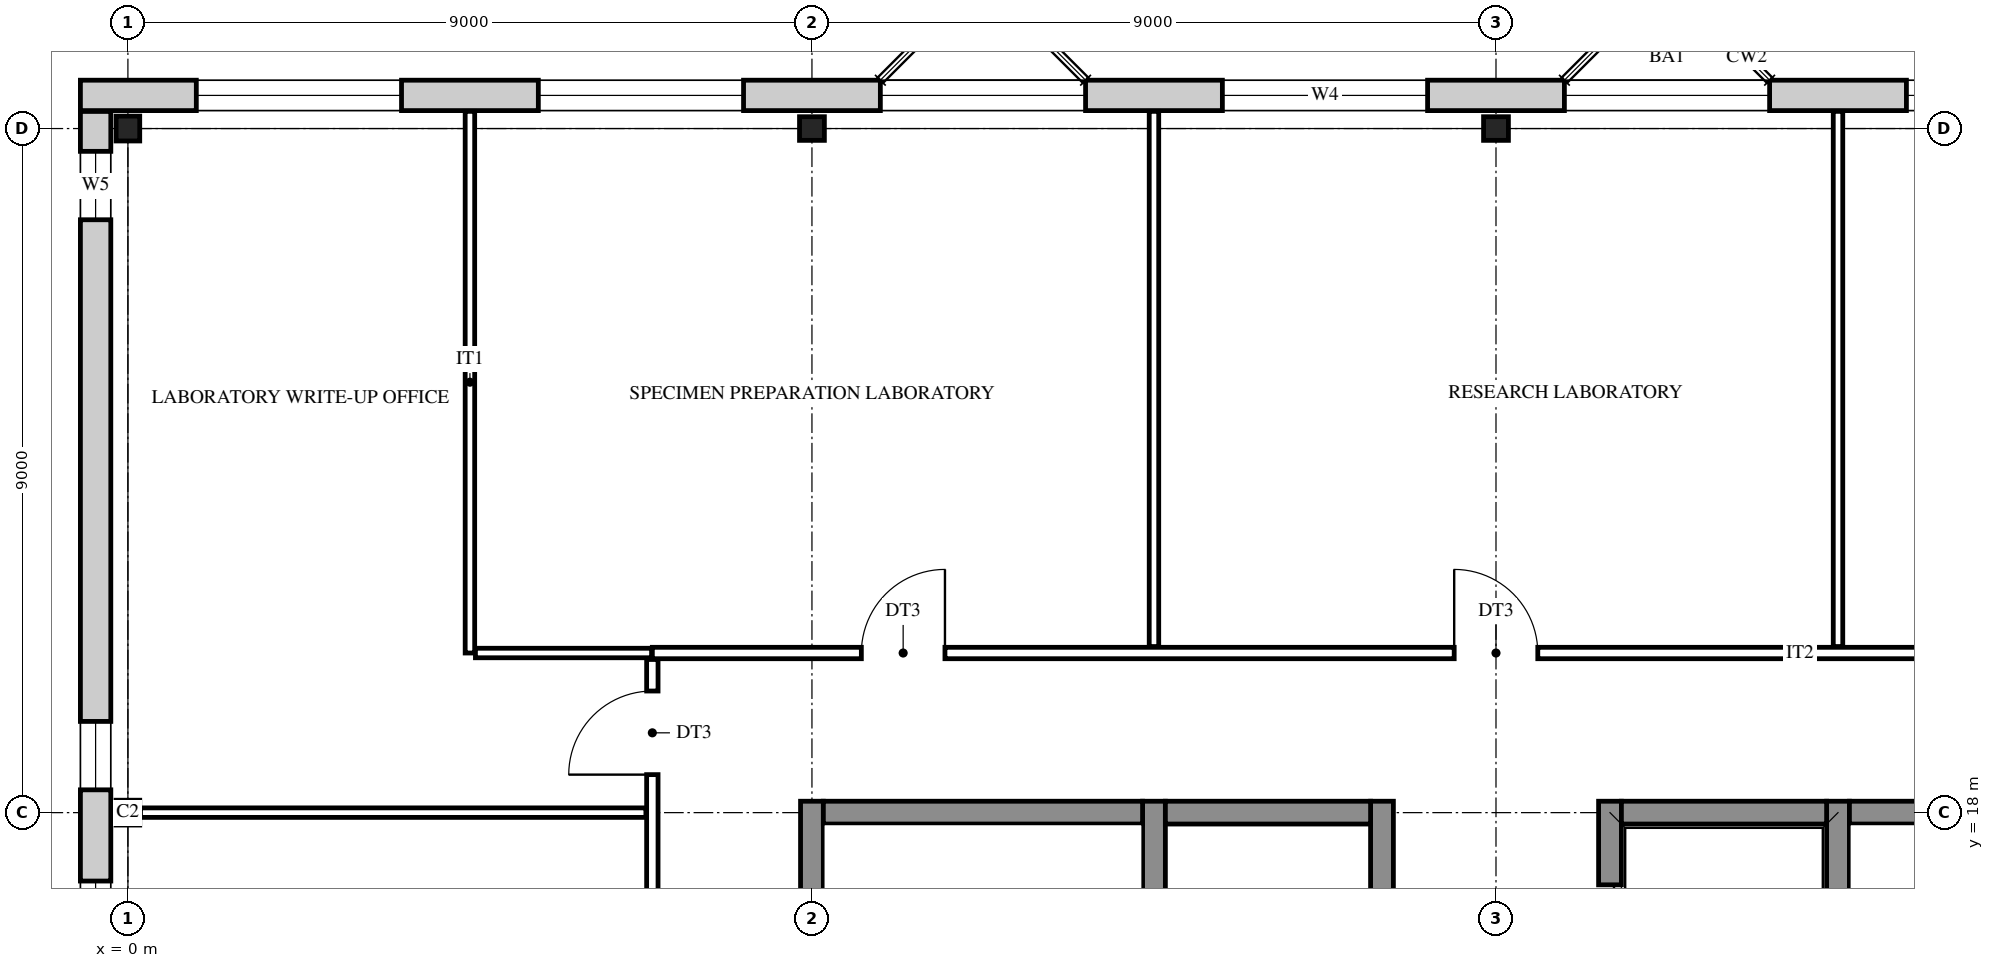
"""IFC4 building model, lengths in metres.
Left out: names, types, materials, properties, quantities, classifications, styles, units other than length and angle.
Written with IfcOpenShell. Run it as: python <this file> out.ifc"""

import sys

from ifc_helpers import new_model, si_unit, direction, frame, frame_2d, origin, origin_2d, place, context, subcontext, project, spatial, rectangle, i_section, extrude, element, fill, save


model = new_model("IFC4")
c1 = context("Model", 3, precision=1e-05, world=origin(), true_north=direction((0.0, 1.0)))
c2 = subcontext(c1, "Body", "Model", "MODEL_VIEW")
j1 = project(units=[si_unit("LENGTHUNIT", "METRE"), si_unit("PLANEANGLEUNIT", "RADIAN")], contexts=[c1])
p1 = place(None, origin())
s1 = spatial("IfcSite", under=j1, at=p1, CompositionType="ELEMENT")
p2 = place(p1, origin())
s2 = spatial("IfcBuilding", under=s1, at=p2, CompositionType="ELEMENT")
p3 = place(p2, frame((0.0, 0.0, 27.6)))
s3 = spatial("IfcBuildingStorey", under=s2, at=p3, CompositionType="ELEMENT", Elevation=27.6)
for number, where, z_axis, x_axis in (
    (1, (0.0, 18.0, 0.0), (0.0, 0.0, 1.0), (1.0, 0.0, 0.0)),
    (2, (0.0, 27.0, 0.0), (0.0, 0.0, 1.0), (1.0, 0.0, 0.0)),
    (3, (9.0, 27.0, 0.0), (0.0, 0.0, 1.0), (0.0, 1.0, 0.0)),
    (4, (18.0, 27.0, 0.0), (0.0, 0.0, 1.0), (0.0, 1.0, 0.0)),
):
    element("IfcColumn", number, at=place(p3, frame(where, z_axis=z_axis, x_axis=x_axis)), inside=s3, PredefinedType="COLUMN", context=c2, shape_type="SweptSolid", body=[
        extrude(i_section(OverallWidth=0.311, OverallDepth=0.327, WebThickness=0.016, FlangeThickness=0.025, FilletRadius=0.017, at=origin_2d()), origin(), (0.0, 0.0, 1.0), 4.2),
    ])
for number, where, z_axis, x_axis in (
    (5, (9.0, 8.85, 0.0), (0.0, 0.0, 1.0), (0.0, 1.0, 0.0)),
    (6, (13.5, 8.85, 0.0), (0.0, 0.0, 1.0), (0.0, 1.0, 0.0)),
):
    element("IfcWall", number, at=place(p3, frame(where, z_axis=z_axis, x_axis=x_axis)), inside=s3, PredefinedType="SHEAR", context=c2, shape_type="SweptSolid", body=[
        extrude(rectangle(XDim=9.3, YDim=0.3, at=frame_2d((4.65, 0.0))), origin(), (0.0, 0.0, 1.0), 4.2),
    ])
p4 = place(p3, frame((16.5, 8.85, 0.0), z_axis=(0.0, 0.0, 1.0), x_axis=(0.0, 1.0, 0.0)))
e7 = element("IfcWall", 7, at=p4, inside=s3, PredefinedType="SHEAR", context=c2, shape_type="SweptSolid", body=[
    extrude(rectangle(XDim=9.3, YDim=0.3, at=frame_2d((4.65, 0.0))), origin(), (0.0, 0.0, 1.0), 4.2),
])
p5 = place(p4, frame((1.1, 0.0, 0.0)))
e8 = element("IfcOpeningElement", 8, at=p5, cuts=e7, PredefinedType="OPENING", context=c2, shape_type="SweptSolid", body=[
    extrude(rectangle(XDim=1.1, YDim=2.1, at=frame_2d((0.55, 1.05))), frame((0.0, 0.16, 0.0), z_axis=(0.0, -1.0, 0.0), x_axis=(1.0, 0.0, 0.0)), (0.0, 0.0, 1.0), 0.32),
])
p6 = place(p4, frame((4.1, 0.0, 0.0)))
e9 = element("IfcOpeningElement", 9, at=p6, cuts=e7, PredefinedType="OPENING", context=c2, shape_type="SweptSolid", body=[
    extrude(rectangle(XDim=1.1, YDim=2.1, at=frame_2d((0.55, 1.05))), frame((0.0, 0.16, 0.0), z_axis=(0.0, -1.0, 0.0), x_axis=(1.0, 0.0, 0.0)), (0.0, 0.0, 1.0), 0.32),
])
p7 = place(p3, frame((19.5, 8.85, 0.0), z_axis=(0.0, 0.0, 1.0), x_axis=(0.0, 1.0, 0.0)))
e10 = element("IfcWall", 10, at=p7, inside=s3, PredefinedType="SHEAR", context=c2, shape_type="SweptSolid", body=[
    extrude(rectangle(XDim=9.3, YDim=0.3, at=frame_2d((4.65, 0.0))), origin(), (0.0, 0.0, 1.0), 4.2),
])
p8 = place(p7, frame((3.95, 0.0, 0.0)))
e11 = element("IfcOpeningElement", 11, at=p8, cuts=e10, PredefinedType="OPENING", context=c2, shape_type="SweptSolid", body=[
    extrude(rectangle(XDim=1.4, YDim=2.1, at=frame_2d((0.7, 1.05))), frame((0.0, 0.16, 0.0), z_axis=(0.0, -1.0, 0.0), x_axis=(1.0, 0.0, 0.0)), (0.0, 0.0, 1.0), 0.32),
])
p9 = place(p7, frame((7.1, 0.0, 0.0)))
e12 = element("IfcOpeningElement", 12, at=p9, cuts=e10, PredefinedType="OPENING", context=c2, shape_type="SweptSolid", body=[
    extrude(rectangle(XDim=1.1, YDim=2.1, at=frame_2d((0.55, 1.05))), frame((0.0, 0.16, 0.0), z_axis=(0.0, -1.0, 0.0), x_axis=(1.0, 0.0, 0.0)), (0.0, 0.0, 1.0), 0.32),
])
p10 = place(p3, frame((22.5, 8.85, 0.0), z_axis=(0.0, 0.0, 1.0), x_axis=(0.0, 1.0, 0.0)))
e13 = element("IfcWall", 13, at=p10, inside=s3, PredefinedType="SHEAR", context=c2, shape_type="SweptSolid", body=[
    extrude(rectangle(XDim=9.3, YDim=0.3, at=frame_2d((4.65, 0.0))), origin(), (0.0, 0.0, 1.0), 4.2),
])
p11 = place(p3, frame((9.15, 18.0, 0.0), z_axis=(0.0, 0.0, 1.0), x_axis=(1.0, 0.0, 0.0)))
e14 = element("IfcWall", 14, at=p11, inside=s3, PredefinedType="SHEAR", context=c2, shape_type="SweptSolid", body=[
    extrude(rectangle(XDim=4.2, YDim=0.3, at=frame_2d((2.1, 0.0))), origin(), (0.0, 0.0, 1.0), 4.2),
])
for number, where, z_axis, x_axis in (
    (15, (13.65, 18.0, 0.0), (0.0, 0.0, 1.0), (1.0, 0.0, 0.0)),
    (16, (19.65, 18.0, 0.0), (0.0, 0.0, 1.0), (1.0, 0.0, 0.0)),
):
    element("IfcWall", number, at=place(p3, frame(where, z_axis=z_axis, x_axis=x_axis)), inside=s3, PredefinedType="SHEAR", context=c2, shape_type="SweptSolid", body=[
        extrude(rectangle(XDim=2.7, YDim=0.3, at=frame_2d((1.35, 0.0))), origin(), (0.0, 0.0, 1.0), 4.2),
    ])
p12 = place(p3, frame((22.65, 18.0, 0.0), z_axis=(0.0, 0.0, 1.0), x_axis=(1.0, 0.0, 0.0)))
e17 = element("IfcWall", 17, at=p12, inside=s3, PredefinedType="SHEAR", context=c2, shape_type="SweptSolid", body=[
    extrude(rectangle(XDim=4.2, YDim=0.3, at=frame_2d((2.1, 0.0))), origin(), (0.0, 0.0, 1.0), 4.2),
])
p13 = place(p3, frame((-0.425, -0.225, 0.0), z_axis=(0.0, 0.0, 1.0), x_axis=(0.0, 1.0, 0.0)))
e18 = element("IfcWall", 18, at=p13, inside=s3, PredefinedType="STANDARD", context=c2, shape_type="SweptSolid", body=[
    extrude(rectangle(XDim=27.45, YDim=0.4, at=frame_2d((13.725, 0.0))), origin(), (0.0, 0.0, 1.0), 4.2),
])
p14 = place(p13, frame((0.525, 0.0, 0.9)))
e19 = element("IfcOpeningElement", 19, at=p14, cuts=e18, PredefinedType="OPENING", context=c2, shape_type="SweptSolid", body=[
    extrude(rectangle(XDim=0.9, YDim=2.0, at=frame_2d((0.45, 1.0))), frame((0.0, 0.21, 0.0), z_axis=(0.0, -1.0, 0.0), x_axis=(1.0, 0.0, 0.0)), (0.0, 0.0, 1.0), 0.42),
])
p15 = place(p13, frame((8.025, 0.0, 0.9)))
e20 = element("IfcOpeningElement", 20, at=p15, cuts=e18, PredefinedType="OPENING", context=c2, shape_type="SweptSolid", body=[
    extrude(rectangle(XDim=0.9, YDim=2.0, at=frame_2d((0.45, 1.0))), frame((0.0, 0.21, 0.0), z_axis=(0.0, -1.0, 0.0), x_axis=(1.0, 0.0, 0.0)), (0.0, 0.0, 1.0), 0.42),
])
p16 = place(p13, frame((10.125, 0.0, 0.9)))
e21 = element("IfcOpeningElement", 21, at=p16, cuts=e18, PredefinedType="OPENING", context=c2, shape_type="SweptSolid", body=[
    extrude(rectangle(XDim=2.7, YDim=2.5, at=frame_2d((1.35, 1.25))), frame((0.0, 0.21, 0.0), z_axis=(0.0, -1.0, 0.0), x_axis=(1.0, 0.0, 0.0)), (0.0, 0.0, 1.0), 0.42),
])
p17 = place(p13, frame((14.625, 0.0, 0.9)))
e22 = element("IfcOpeningElement", 22, at=p17, cuts=e18, PredefinedType="OPENING", context=c2, shape_type="SweptSolid", body=[
    extrude(rectangle(XDim=2.7, YDim=2.5, at=frame_2d((1.35, 1.25))), frame((0.0, 0.21, 0.0), z_axis=(0.0, -1.0, 0.0), x_axis=(1.0, 0.0, 0.0)), (0.0, 0.0, 1.0), 0.42),
])
p18 = place(p13, frame((18.525, 0.0, 0.9)))
e23 = element("IfcOpeningElement", 23, at=p18, cuts=e18, PredefinedType="OPENING", context=c2, shape_type="SweptSolid", body=[
    extrude(rectangle(XDim=0.9, YDim=2.0, at=frame_2d((0.45, 1.0))), frame((0.0, 0.21, 0.0), z_axis=(0.0, -1.0, 0.0), x_axis=(1.0, 0.0, 0.0)), (0.0, 0.0, 1.0), 0.42),
])
p19 = place(p13, frame((26.025, 0.0, 0.9)))
e24 = element("IfcOpeningElement", 24, at=p19, cuts=e18, PredefinedType="OPENING", context=c2, shape_type="SweptSolid", body=[
    extrude(rectangle(XDim=0.9, YDim=2.0, at=frame_2d((0.45, 1.0))), frame((0.0, 0.21, 0.0), z_axis=(0.0, -1.0, 0.0), x_axis=(1.0, 0.0, 0.0)), (0.0, 0.0, 1.0), 0.42),
])
p20 = place(p3, frame((-0.625, 27.436, 0.0), z_axis=(0.0, 0.0, 1.0), x_axis=(1.0, 0.0, 0.0)))
e25 = element("IfcWall", 25, at=p20, inside=s3, PredefinedType="STANDARD", context=c2, shape_type="SweptSolid", body=[
    extrude(rectangle(XDim=32.75, YDim=0.4, at=frame_2d((16.375, 0.0))), origin(), (0.0, 0.0, 1.0), 4.2),
])
p21 = place(p20, frame((1.525, 0.0, 0.9)))
e26 = element("IfcOpeningElement", 26, at=p21, cuts=e25, PredefinedType="OPENING", context=c2, shape_type="SweptSolid", body=[
    extrude(rectangle(XDim=2.7, YDim=2.5, at=frame_2d((1.35, 1.25))), frame((0.0, 0.21, 0.0), z_axis=(0.0, -1.0, 0.0), x_axis=(1.0, 0.0, 0.0)), (0.0, 0.0, 1.0), 0.42),
])
p22 = place(p20, frame((6.025, 0.0, 0.9)))
e27 = element("IfcOpeningElement", 27, at=p22, cuts=e25, PredefinedType="OPENING", context=c2, shape_type="SweptSolid", body=[
    extrude(rectangle(XDim=2.7, YDim=2.5, at=frame_2d((1.35, 1.25))), frame((0.0, 0.21, 0.0), z_axis=(0.0, -1.0, 0.0), x_axis=(1.0, 0.0, 0.0)), (0.0, 0.0, 1.0), 0.42),
])
p23 = place(p20, frame((10.525, 0.0, 0.9)))
e28 = element("IfcOpeningElement", 28, at=p23, cuts=e25, PredefinedType="OPENING", context=c2, shape_type="SweptSolid", body=[
    extrude(rectangle(XDim=2.7, YDim=2.5, at=frame_2d((1.35, 1.25))), frame((0.0, 0.21, 0.0), z_axis=(0.0, -1.0, 0.0), x_axis=(1.0, 0.0, 0.0)), (0.0, 0.0, 1.0), 0.42),
])
p24 = place(p20, frame((15.025, 0.0, 0.9)))
e29 = element("IfcOpeningElement", 29, at=p24, cuts=e25, PredefinedType="OPENING", context=c2, shape_type="SweptSolid", body=[
    extrude(rectangle(XDim=2.7, YDim=2.5, at=frame_2d((1.35, 1.25))), frame((0.0, 0.21, 0.0), z_axis=(0.0, -1.0, 0.0), x_axis=(1.0, 0.0, 0.0)), (0.0, 0.0, 1.0), 0.42),
])
p25 = place(p20, frame((19.525, 0.0, 0.9)))
e30 = element("IfcOpeningElement", 30, at=p25, cuts=e25, PredefinedType="OPENING", context=c2, shape_type="SweptSolid", body=[
    extrude(rectangle(XDim=2.7, YDim=2.5, at=frame_2d((1.35, 1.25))), frame((0.0, 0.21, 0.0), z_axis=(0.0, -1.0, 0.0), x_axis=(1.0, 0.0, 0.0)), (0.0, 0.0, 1.0), 0.42),
])
p26 = place(p20, frame((24.025, 0.0, 0.9)))
e31 = element("IfcOpeningElement", 31, at=p26, cuts=e25, PredefinedType="OPENING", context=c2, shape_type="SweptSolid", body=[
    extrude(rectangle(XDim=2.7, YDim=2.5, at=frame_2d((1.35, 1.25))), frame((0.0, 0.21, 0.0), z_axis=(0.0, -1.0, 0.0), x_axis=(1.0, 0.0, 0.0)), (0.0, 0.0, 1.0), 0.42),
])
p27 = place(p20, frame((28.525, 0.0, 0.9)))
e32 = element("IfcOpeningElement", 32, at=p27, cuts=e25, PredefinedType="OPENING", context=c2, shape_type="SweptSolid", body=[
    extrude(rectangle(XDim=2.7, YDim=2.5, at=frame_2d((1.35, 1.25))), frame((0.0, 0.21, 0.0), z_axis=(0.0, -1.0, 0.0), x_axis=(1.0, 0.0, 0.0)), (0.0, 0.0, 1.0), 0.42),
])
p28 = place(p3, frame((4.5, 20.1, 0.0), z_axis=(0.0, 0.0, 1.0), x_axis=(0.0, 1.0, 0.0)))
e33 = element("IfcWall", 33, at=p28, inside=s3, PredefinedType="PARTITIONING", context=c2, shape_type="SweptSolid", body=[
    extrude(rectangle(XDim=7.126, YDim=0.125, at=frame_2d((3.563, 0.0))), origin(), (0.0, 0.0, 1.0), 3.537),
])
p29 = place(p3, frame((6.9, 6.9, 0.0), z_axis=(0.0, 0.0, 1.0), x_axis=(0.0, 1.0, 0.0)))
e34 = element("IfcWall", 34, at=p29, inside=s3, PredefinedType="PARTITIONING", context=c2, shape_type="SweptSolid", body=[
    extrude(rectangle(XDim=13.115, YDim=0.15, at=frame_2d((6.558, 0.0))), origin(), (0.0, 0.0, 1.0), 3.537),
])
p30 = place(p29, frame((11.6, 0.0, 0.0)))
e35 = element("IfcOpeningElement", 35, at=p30, cuts=e34, PredefinedType="OPENING", context=c2, shape_type="SweptSolid", body=[
    extrude(rectangle(XDim=1.1, YDim=2.1, at=frame_2d((0.55, 1.05))), frame((0.0, 0.085, 0.0), z_axis=(0.0, -1.0, 0.0), x_axis=(1.0, 0.0, 0.0)), (0.0, 0.0, 1.0), 0.17),
])
p31 = place(p29, frame((6.05, 0.0, 0.0)))
e36 = element("IfcOpeningElement", 36, at=p31, cuts=e34, PredefinedType="OPENING", context=c2, shape_type="SweptSolid", body=[
    extrude(rectangle(XDim=1.1, YDim=2.1, at=frame_2d((0.55, 1.05))), frame((0.0, 0.085, 0.0), z_axis=(0.0, -1.0, 0.0), x_axis=(1.0, 0.0, 0.0)), (0.0, 0.0, 1.0), 0.17),
])
for number, where, z_axis, x_axis in (
    (37, (13.5, 20.185, 0.0), (0.0, 0.0, 1.0), (0.0, 1.0, 0.0)),
    (38, (22.5, 20.185, 0.0), (0.0, 0.0, 1.0), (0.0, 1.0, 0.0)),
):
    element("IfcWall", number, at=place(p3, frame(where, z_axis=z_axis, x_axis=x_axis)), inside=s3, PredefinedType="PARTITIONING", context=c2, shape_type="SweptSolid", body=[
        extrude(rectangle(XDim=7.041, YDim=0.125, at=frame_2d((3.521, 0.0))), origin(), (0.0, 0.0, 1.0), 3.537),
    ])
p32 = place(p3, frame((0.166, 18.0, 0.0), z_axis=(0.0, 0.0, 1.0), x_axis=(1.0, 0.0, 0.0)))
e39 = element("IfcWall", 39, at=p32, inside=s3, PredefinedType="PARTITIONING", context=c2, shape_type="SweptSolid", body=[
    extrude(rectangle(XDim=6.649, YDim=0.125, at=frame_2d((3.325, 0.0))), origin(), (0.0, 0.0, 1.0), 3.537),
])
p33 = place(p3, frame((4.573, 20.1, 0.0), z_axis=(0.0, 0.0, 1.0), x_axis=(1.0, 0.0, 0.0)))
e40 = element("IfcWall", 40, at=p33, inside=s3, PredefinedType="PARTITIONING", context=c2, shape_type="SweptSolid", body=[
    extrude(rectangle(XDim=2.317, YDim=0.125, at=frame_2d((1.159, 0.0))), origin(), (0.0, 0.0, 1.0), 3.537),
])
p34 = place(p3, frame((6.9, 20.1, 0.0), z_axis=(0.0, 0.0, 1.0), x_axis=(1.0, 0.0, 0.0)))
e41 = element("IfcWall", 41, at=p34, inside=s3, PredefinedType="PARTITIONING", context=c2, shape_type="SweptSolid", body=[
    extrude(rectangle(XDim=20.1, YDim=0.15, at=frame_2d((10.05, 0.0))), origin(), (0.0, 0.0, 1.0), 3.537),
])
p35 = place(p34, frame((2.75, 0.0, 0.0)))
e42 = element("IfcOpeningElement", 42, at=p35, cuts=e41, PredefinedType="OPENING", context=c2, shape_type="SweptSolid", body=[
    extrude(rectangle(XDim=1.1, YDim=2.1, at=frame_2d((0.55, 1.05))), frame((0.0, 0.085, 0.0), z_axis=(0.0, -1.0, 0.0), x_axis=(1.0, 0.0, 0.0)), (0.0, 0.0, 1.0), 0.17),
])
p36 = place(p34, frame((10.55, 0.0, 0.0)))
e43 = element("IfcOpeningElement", 43, at=p36, cuts=e41, PredefinedType="OPENING", context=c2, shape_type="SweptSolid", body=[
    extrude(rectangle(XDim=1.1, YDim=2.1, at=frame_2d((0.55, 1.05))), frame((0.0, 0.085, 0.0), z_axis=(0.0, -1.0, 0.0), x_axis=(1.0, 0.0, 0.0)), (0.0, 0.0, 1.0), 0.17),
])
p37 = place(p34, frame((18.55, 0.0, 0.0)))
e44 = element("IfcOpeningElement", 44, at=p37, cuts=e41, PredefinedType="OPENING", context=c2, shape_type="SweptSolid", body=[
    extrude(rectangle(XDim=1.0, YDim=2.1, at=frame_2d((0.5, 1.05))), frame((0.0, 0.085, 0.0), z_axis=(0.0, -1.0, 0.0), x_axis=(1.0, 0.0, 0.0)), (0.0, 0.0, 1.0), 0.17),
])
p38 = place(p17, origin())
e45 = element("IfcWindow", 45, at=p38, inside=s3, PartitioningType="SINGLE_PANEL", PredefinedType="WINDOW", context=c2, shape_type="SweptSolid", body=[
    extrude(rectangle(XDim=2.7, YDim=2.5, at=frame_2d((1.35, 1.25))), frame((0.0, 0.03, 0.0), z_axis=(0.0, -1.0, 0.0), x_axis=(1.0, 0.0, 0.0)), (0.0, 0.0, 1.0), 0.06),
])
fill(e22, e45)
p39 = place(p18, origin())
e46 = element("IfcWindow", 46, at=p39, inside=s3, PartitioningType="SINGLE_PANEL", PredefinedType="WINDOW", context=c2, shape_type="SweptSolid", body=[
    extrude(rectangle(XDim=0.9, YDim=2.0, at=frame_2d((0.45, 1.0))), frame((0.0, 0.03, 0.0), z_axis=(0.0, -1.0, 0.0), x_axis=(1.0, 0.0, 0.0)), (0.0, 0.0, 1.0), 0.06),
])
fill(e23, e46)
p40 = place(p19, origin())
e47 = element("IfcWindow", 47, at=p40, inside=s3, PartitioningType="SINGLE_PANEL", PredefinedType="WINDOW", context=c2, shape_type="SweptSolid", body=[
    extrude(rectangle(XDim=0.9, YDim=2.0, at=frame_2d((0.45, 1.0))), frame((0.0, 0.03, 0.0), z_axis=(0.0, -1.0, 0.0), x_axis=(1.0, 0.0, 0.0)), (0.0, 0.0, 1.0), 0.06),
])
fill(e24, e47)
p41 = place(p21, origin())
e48 = element("IfcWindow", 48, at=p41, inside=s3, PartitioningType="SINGLE_PANEL", PredefinedType="WINDOW", context=c2, shape_type="SweptSolid", body=[
    extrude(rectangle(XDim=2.7, YDim=2.5, at=frame_2d((1.35, 1.25))), frame((0.0, 0.03, 0.0), z_axis=(0.0, -1.0, 0.0), x_axis=(1.0, 0.0, 0.0)), (0.0, 0.0, 1.0), 0.06),
])
fill(e26, e48)
p42 = place(p22, origin())
e49 = element("IfcWindow", 49, at=p42, inside=s3, PartitioningType="SINGLE_PANEL", PredefinedType="WINDOW", context=c2, shape_type="SweptSolid", body=[
    extrude(rectangle(XDim=2.7, YDim=2.5, at=frame_2d((1.35, 1.25))), frame((0.0, 0.03, 0.0), z_axis=(0.0, -1.0, 0.0), x_axis=(1.0, 0.0, 0.0)), (0.0, 0.0, 1.0), 0.06),
])
fill(e27, e49)
p43 = place(p23, origin())
e50 = element("IfcWindow", 50, at=p43, inside=s3, PartitioningType="SINGLE_PANEL", PredefinedType="WINDOW", context=c2, shape_type="SweptSolid", body=[
    extrude(rectangle(XDim=2.7, YDim=2.5, at=frame_2d((1.35, 1.25))), frame((0.0, 0.03, 0.0), z_axis=(0.0, -1.0, 0.0), x_axis=(1.0, 0.0, 0.0)), (0.0, 0.0, 1.0), 0.06),
])
fill(e28, e50)
p44 = place(p24, origin())
e51 = element("IfcWindow", 51, at=p44, inside=s3, PartitioningType="SINGLE_PANEL", PredefinedType="WINDOW", context=c2, shape_type="SweptSolid", body=[
    extrude(rectangle(XDim=2.7, YDim=2.5, at=frame_2d((1.35, 1.25))), frame((0.0, 0.03, 0.0), z_axis=(0.0, -1.0, 0.0), x_axis=(1.0, 0.0, 0.0)), (0.0, 0.0, 1.0), 0.06),
])
fill(e29, e51)
p45 = place(p25, origin())
e52 = element("IfcWindow", 52, at=p45, inside=s3, PartitioningType="SINGLE_PANEL", PredefinedType="WINDOW", context=c2, shape_type="SweptSolid", body=[
    extrude(rectangle(XDim=2.7, YDim=2.5, at=frame_2d((1.35, 1.25))), frame((0.0, 0.03, 0.0), z_axis=(0.0, -1.0, 0.0), x_axis=(1.0, 0.0, 0.0)), (0.0, 0.0, 1.0), 0.06),
])
fill(e30, e52)
p46 = place(p26, origin())
e53 = element("IfcWindow", 53, at=p46, inside=s3, PartitioningType="SINGLE_PANEL", PredefinedType="WINDOW", context=c2, shape_type="SweptSolid", body=[
    extrude(rectangle(XDim=2.7, YDim=2.5, at=frame_2d((1.35, 1.25))), frame((0.0, 0.03, 0.0), z_axis=(0.0, -1.0, 0.0), x_axis=(1.0, 0.0, 0.0)), (0.0, 0.0, 1.0), 0.06),
])
fill(e31, e53)
p47 = place(p30, origin())
e54 = element("IfcDoor", 54, at=p47, inside=s3, OperationType="SINGLE_SWING_LEFT", PredefinedType="DOOR", context=c2, shape_type="SweptSolid", body=[
    extrude(rectangle(XDim=1.1, YDim=2.1, at=frame_2d((0.55, 1.05))), frame((0.0, 0.025, 0.0), z_axis=(0.0, -1.0, 0.0), x_axis=(1.0, 0.0, 0.0)), (0.0, 0.0, 1.0), 0.05),
])
fill(e35, e54)
p48 = place(p35, origin())
e55 = element("IfcDoor", 55, at=p48, inside=s3, OperationType="SINGLE_SWING_RIGHT", PredefinedType="DOOR", context=c2, shape_type="SweptSolid", body=[
    extrude(rectangle(XDim=1.1, YDim=2.1, at=frame_2d((0.55, 1.05))), frame((0.0, 0.025, 0.0), z_axis=(0.0, -1.0, 0.0), x_axis=(1.0, 0.0, 0.0)), (0.0, 0.0, 1.0), 0.05),
])
fill(e42, e55)
p49 = place(p36, origin())
e56 = element("IfcDoor", 56, at=p49, inside=s3, OperationType="SINGLE_SWING_LEFT", PredefinedType="DOOR", context=c2, shape_type="SweptSolid", body=[
    extrude(rectangle(XDim=1.1, YDim=2.1, at=frame_2d((0.55, 1.05))), frame((0.0, 0.025, 0.0), z_axis=(0.0, -1.0, 0.0), x_axis=(1.0, 0.0, 0.0)), (0.0, 0.0, 1.0), 0.05),
])
fill(e43, e56)
p50 = place(p9, origin())
e57 = element("IfcDoor", 57, at=p50, inside=s3, OperationType="DOUBLE_DOOR_SLIDING", PredefinedType="DOOR", context=c2, shape_type="SweptSolid", body=[
    extrude(rectangle(XDim=1.1, YDim=2.1, at=frame_2d((0.55, 1.05))), frame((0.0, 0.025, 0.0), z_axis=(0.0, -1.0, 0.0), x_axis=(1.0, 0.0, 0.0)), (0.0, 0.0, 1.0), 0.05),
])
fill(e12, e57)
save(model, sys.argv[1])
